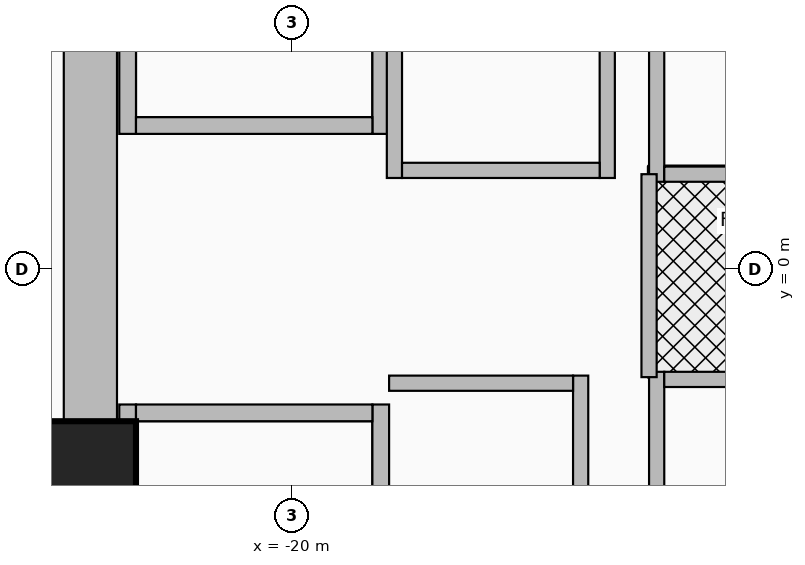
"""IFC4 building model, lengths in metres.
Left out: names, types, materials, properties, quantities, classifications, styles, units other than length and angle.
Written with IfcOpenShell. Run it as: python <this file> out.ifc"""

import sys

from ifc_helpers import new_model, si_unit, direction, frame, frame_2d, origin, origin_2d, place, context, subcontext, project, spatial, rectangle, extrude, source, transform, mapped, element, fill, save


model = new_model("IFC4")
c1 = context("Model", 3, precision=1e-05, world=origin(), true_north=direction((0.0, 1.0)))
c2 = subcontext(c1, "Body", "Model", "MODEL_VIEW")
j1 = project(units=[si_unit("LENGTHUNIT", "METRE"), si_unit("PLANEANGLEUNIT", "RADIAN")], contexts=[c1])
p1 = place(None, origin())
s1 = spatial("IfcSite", under=j1, at=p1, CompositionType="ELEMENT")
p2 = place(p1, origin())
s2 = spatial("IfcBuilding", under=s1, at=p2, CompositionType="ELEMENT")
p3 = place(p2, frame((0.0, 0.0, 101.1)))
s3 = spatial("IfcBuildingStorey", under=s2, at=p3, CompositionType="ELEMENT", Elevation=101.1)
for number, where, z_axis, x_axis in (
    (1, (-22.16, 1.78, 0.0), (0.0, 0.0, 1.0), (0.0, 1.0, 0.0)),
    (2, (-18.83, 1.78, 0.0), (0.0, 0.0, 1.0), (0.0, 1.0, 0.0)),
):
    element("IfcWall", number, at=place(p3, frame(where, z_axis=z_axis, x_axis=x_axis)), inside=s3, PredefinedType="SHEAR", context=c2, shape_type="SweptSolid", body=[
        extrude(rectangle(XDim=8.67, YDim=0.22, at=frame_2d((4.335, 0.0))), origin(), (0.0, 0.0, 1.0), 4.36),
    ])
p4 = place(p3, frame((-22.05, 1.89, 0.0), z_axis=(0.0, 0.0, 1.0), x_axis=(1.0, 0.0, 0.0)))
e3 = element("IfcWall", 3, at=p4, inside=s3, PredefinedType="SHEAR", context=c2, shape_type="SweptSolid", body=[
    extrude(rectangle(XDim=3.11, YDim=0.22, at=frame_2d((1.555, 0.0))), origin(), (0.0, 0.0, 1.0), 4.36),
])
p5 = place(p4, frame((1.0, 0.0, 0.0)))
e4 = element("IfcOpeningElement", 4, at=p5, cuts=e3, PredefinedType="OPENING", context=c2, shape_type="SweptSolid", body=[
    extrude(rectangle(XDim=1.1, YDim=2.15, at=frame_2d((0.55, 1.075))), frame((0.0, 0.125, 0.0), z_axis=(0.0, -1.0, 0.0), x_axis=(1.0, 0.0, 0.0)), (0.0, 0.0, 1.0), 0.25),
])
for number, where, z_axis, x_axis in (
    (5, (-22.16, -10.45, 0.0), (0.0, 0.0, 1.0), (0.0, 1.0, 0.0)),
    (6, (-18.83, -10.45, 0.0), (0.0, 0.0, 1.0), (0.0, 1.0, 0.0)),
):
    element("IfcWall", number, at=place(p3, frame(where, z_axis=z_axis, x_axis=x_axis)), inside=s3, PredefinedType="SHEAR", context=c2, shape_type="SweptSolid", body=[
        extrude(rectangle(XDim=8.67, YDim=0.22, at=frame_2d((4.335, 0.0))), origin(), (0.0, 0.0, 1.0), 4.36),
    ])
p6 = place(p3, frame((-22.05, -1.89, 0.0), z_axis=(0.0, 0.0, 1.0), x_axis=(1.0, 0.0, 0.0)))
e7 = element("IfcWall", 7, at=p6, inside=s3, PredefinedType="SHEAR", context=c2, shape_type="SweptSolid", body=[
    extrude(rectangle(XDim=3.11, YDim=0.22, at=frame_2d((1.555, 0.0))), origin(), (0.0, 0.0, 1.0), 4.36),
])
p7 = place(p6, frame((1.0, 0.0, 0.0)))
e8 = element("IfcOpeningElement", 8, at=p7, cuts=e7, PredefinedType="OPENING", context=c2, shape_type="SweptSolid", body=[
    extrude(rectangle(XDim=1.1, YDim=2.15, at=frame_2d((0.55, 1.075))), frame((0.0, 0.125, 0.0), z_axis=(0.0, -1.0, 0.0), x_axis=(1.0, 0.0, 0.0)), (0.0, 0.0, 1.0), 0.25),
])
p8 = place(p3, frame((-22.65, -11.15, 0.0), z_axis=(0.0, 0.0, 1.0), x_axis=(0.0, 1.0, 0.0)))
e9 = element("IfcWall", 9, at=p8, inside=s3, PredefinedType="SHEAR", context=c2, shape_type="SweptSolid", body=[
    extrude(rectangle(XDim=22.3, YDim=0.7, at=frame_2d((11.15, 0.0))), origin(), (0.0, 0.0, 1.0), 4.36),
])
m1 = source(origin(), c2, "Body", "SweptSolid", [
    extrude(rectangle(XDim=1.2, YDim=1.2, at=origin_2d()), origin(), (0.0, 0.0, 1.0), 4.6),
])
p9 = place(p3, frame((-22.65, -2.6, 0.0), z_axis=(0.0, 0.0, 1.0), x_axis=(1.0, 0.0, 0.0)))
e10 = element("IfcColumn", 10, at=p9, inside=s3, PredefinedType="COLUMN", context=c2, shape_type="MappedRepresentation", body=[
    mapped(m1, transform((0.0, 0.0, 0.0), x_axis=(1.0, 0.0, 0.0), y_axis=(0.0, 1.0, 0.0), z_axis=(0.0, 0.0, 1.0), scale=1.0)),
])
for number, where, z_axis, x_axis in (
    (11, (-18.65, 1.2, 0.0), (0.0, 0.0, 1.0), (0.0, 1.0, 0.0)),
    (12, (-15.85, 1.2, 0.0), (0.0, 0.0, 1.0), (0.0, 1.0, 0.0)),
):
    element("IfcWall", number, at=place(p3, frame(where, z_axis=z_axis, x_axis=x_axis)), inside=s3, PredefinedType="MOVABLE", context=c2, shape_type="SweptSolid", body=[
        extrude(rectangle(XDim=3.225, YDim=0.2, at=frame_2d((1.613, 0.0))), origin(), (0.0, 0.0, 1.0), 4.36),
    ])
p10 = place(p3, frame((-18.55, 1.3, 0.0), z_axis=(0.0, 0.0, 1.0), x_axis=(1.0, 0.0, 0.0)))
e13 = element("IfcWall", 13, at=p10, inside=s3, PredefinedType="MOVABLE", context=c2, shape_type="SweptSolid", body=[
    extrude(rectangle(XDim=2.6, YDim=0.2, at=frame_2d((1.3, 0.0))), origin(), (0.0, 0.0, 1.0), 4.36),
])
p11 = place(p10, frame((0.7, 0.0, 0.0)))
e14 = element("IfcOpeningElement", 14, at=p11, cuts=e13, PredefinedType="OPENING", context=c2, shape_type="SweptSolid", body=[
    extrude(rectangle(XDim=1.2, YDim=2.1, at=frame_2d((0.6, 1.05))), frame((0.0, 0.115, 0.0), z_axis=(0.0, -1.0, 0.0), x_axis=(1.0, 0.0, 0.0)), (0.0, 0.0, 1.0), 0.23),
])
p12 = place(p3, frame((-16.2, -4.6, 0.0), z_axis=(0.0, 0.0, 1.0), x_axis=(0.0, 1.0, 0.0)))
e15 = element("IfcWall", 15, at=p12, inside=s3, PredefinedType="MOVABLE", context=c2, shape_type="SweptSolid", body=[
    extrude(rectangle(XDim=3.2, YDim=0.2, at=frame_2d((1.6, 0.0))), origin(), (0.0, 0.0, 1.0), 4.36),
])
p13 = place(p3, frame((-18.72, -1.5, 0.0), z_axis=(0.0, 0.0, 1.0), x_axis=(1.0, 0.0, 0.0)))
e16 = element("IfcWall", 16, at=p13, inside=s3, PredefinedType="MOVABLE", context=c2, shape_type="SweptSolid", body=[
    extrude(rectangle(XDim=2.42, YDim=0.2, at=frame_2d((1.21, 0.0))), origin(), (0.0, 0.0, 1.0), 4.36),
])
p14 = place(p13, frame((0.61, 0.0, 0.0)))
e17 = element("IfcOpeningElement", 17, at=p14, cuts=e16, PredefinedType="OPENING", context=c2, shape_type="SweptSolid", body=[
    extrude(rectangle(XDim=1.2, YDim=2.1, at=frame_2d((0.6, 1.05))), frame((0.0, 0.115, 0.0), z_axis=(0.0, -1.0, 0.0), x_axis=(1.0, 0.0, 0.0)), (0.0, 0.0, 1.0), 0.23),
])
p15 = place(p3, frame((-15.2, 1.15, 0.0), z_axis=(0.0, 0.0, 1.0), x_axis=(0.0, 1.0, 0.0)))
e18 = element("IfcWall", 18, at=p15, inside=s3, PredefinedType="MOVABLE", context=c2, shape_type="SweptSolid", body=[
    extrude(rectangle(XDim=2.25, YDim=0.2, at=frame_2d((1.125, 0.0))), origin(), (0.0, 0.0, 1.0), 4.36),
])
p16 = place(p3, frame((-15.1, 1.25, 0.0), z_axis=(0.0, 0.0, 1.0), x_axis=(1.0, 0.0, 0.0)))
e19 = element("IfcWall", 19, at=p16, inside=s3, PredefinedType="MOVABLE", context=c2, shape_type="SweptSolid", body=[
    extrude(rectangle(XDim=1.92, YDim=0.2, at=frame_2d((0.96, 0.0))), origin(), (0.0, 0.0, 1.0), 4.36),
])
p17 = place(p3, frame((-15.2, -3.7, 0.0), z_axis=(0.0, 0.0, 1.0), x_axis=(0.0, 1.0, 0.0)))
e20 = element("IfcWall", 20, at=p17, inside=s3, PredefinedType="MOVABLE", context=c2, shape_type="SweptSolid", body=[
    extrude(rectangle(XDim=2.35, YDim=0.2, at=frame_2d((1.175, 0.0))), origin(), (0.0, 0.0, 1.0), 4.36),
])
p18 = place(p3, frame((-15.1, -1.45, 0.0), z_axis=(0.0, 0.0, 1.0), x_axis=(1.0, 0.0, 0.0)))
e21 = element("IfcWall", 21, at=p18, inside=s3, PredefinedType="MOVABLE", context=c2, shape_type="SweptSolid", body=[
    extrude(rectangle(XDim=1.92, YDim=0.2, at=frame_2d((0.96, 0.0))), origin(), (0.0, 0.0, 1.0), 4.36),
])
p19 = place(p18, frame((0.41, 0.0, 0.0)))
e22 = element("IfcOpeningElement", 22, at=p19, cuts=e21, PredefinedType="OPENING", context=c2, shape_type="SweptSolid", body=[
    extrude(rectangle(XDim=1.1, YDim=2.1, at=frame_2d((0.55, 1.05))), frame((0.0, 0.115, 0.0), z_axis=(0.0, -1.0, 0.0), x_axis=(1.0, 0.0, 0.0)), (0.0, 0.0, 1.0), 0.23),
])
p20 = place(p3, frame((-15.3, -1.42, 0.0), z_axis=(0.0, 0.0, 1.0), x_axis=(0.0, 1.0, 0.0)))
e23 = element("IfcWall", 23, at=p20, inside=s3, PredefinedType="PARTITIONING", context=c2, shape_type="SweptSolid", body=[
    extrude(rectangle(XDim=2.67, YDim=0.2, at=frame_2d((1.335, 0.0))), origin(), (0.0, 0.0, 1.0), 4.36),
])
p21 = place(p20, frame((0.78, 0.0, 0.0)))
e24 = element("IfcOpeningElement", 24, at=p21, cuts=e23, PredefinedType="OPENING", context=c2, shape_type="SweptSolid", body=[
    extrude(rectangle(XDim=1.05, YDim=2.15, at=frame_2d((0.525, 1.075))), frame((0.0, 0.115, 0.0), z_axis=(0.0, -1.0, 0.0), x_axis=(1.0, 0.0, 0.0)), (0.0, 0.0, 1.0), 0.23),
])
p22 = place(p11, origin())
e25 = element("IfcDoor", 25, at=p22, inside=s3, OperationType="DOUBLE_DOOR_SLIDING", PredefinedType="DOOR", context=c2, shape_type="SweptSolid", body=[
    extrude(rectangle(XDim=1.2, YDim=2.1, at=frame_2d((0.6, 1.05))), frame((0.0, 0.025, 0.0), z_axis=(0.0, -1.0, 0.0), x_axis=(1.0, 0.0, 0.0)), (0.0, 0.0, 1.0), 0.05),
])
fill(e14, e25)
p23 = place(p14, origin())
e26 = element("IfcDoor", 26, at=p23, inside=s3, OperationType="DOUBLE_DOOR_SLIDING", PredefinedType="DOOR", context=c2, shape_type="SweptSolid", body=[
    extrude(rectangle(XDim=1.2, YDim=2.1, at=frame_2d((0.6, 1.05))), frame((0.0, 0.025, 0.0), z_axis=(0.0, -1.0, 0.0), x_axis=(1.0, 0.0, 0.0)), (0.0, 0.0, 1.0), 0.05),
])
fill(e17, e26)
p24 = place(p19, origin())
e27 = element("IfcDoor", 27, at=p24, inside=s3, OperationType="DOUBLE_DOOR_SLIDING", PredefinedType="DOOR", context=c2, shape_type="SweptSolid", body=[
    extrude(rectangle(XDim=1.1, YDim=2.1, at=frame_2d((0.55, 1.05))), frame((0.0, 0.025, 0.0), z_axis=(0.0, -1.0, 0.0), x_axis=(1.0, 0.0, 0.0)), (0.0, 0.0, 1.0), 0.05),
])
fill(e22, e27)
p25 = place(p21, origin())
e28 = element("IfcDoor", 28, at=p25, inside=s3, OperationType="SINGLE_SWING_RIGHT", PredefinedType="DOOR", context=c2, shape_type="SweptSolid", body=[
    extrude(rectangle(XDim=1.05, YDim=2.15, at=frame_2d((0.525, 1.075))), frame((0.0, 0.025, 0.0), z_axis=(0.0, -1.0, 0.0), x_axis=(1.0, 0.0, 0.0)), (0.0, 0.0, 1.0), 0.05),
])
fill(e24, e28)
p26 = place(p5, frame((1.1, 0.0, 0.0), z_axis=(0.0, 0.0, 1.0), x_axis=(-1.0, 0.0, 0.0)))
e29 = element("IfcDoor", 29, at=p26, inside=s3, OperationType="SINGLE_SWING_LEFT", PredefinedType="DOOR", context=c2, shape_type="SweptSolid", body=[
    extrude(rectangle(XDim=1.1, YDim=2.15, at=frame_2d((0.55, 1.075))), frame((0.0, 0.025, 0.0), z_axis=(0.0, -1.0, 0.0), x_axis=(1.0, 0.0, 0.0)), (0.0, 0.0, 1.0), 0.05),
])
fill(e4, e29)
p27 = place(p7, origin())
e30 = element("IfcDoor", 30, at=p27, inside=s3, OperationType="SINGLE_SWING_RIGHT", PredefinedType="DOOR", context=c2, shape_type="SweptSolid", body=[
    extrude(rectangle(XDim=1.1, YDim=2.15, at=frame_2d((0.55, 1.075))), frame((0.0, 0.025, 0.0), z_axis=(0.0, -1.0, 0.0), x_axis=(1.0, 0.0, 0.0)), (0.0, 0.0, 1.0), 0.05),
])
fill(e8, e30)
save(model, sys.argv[1])
